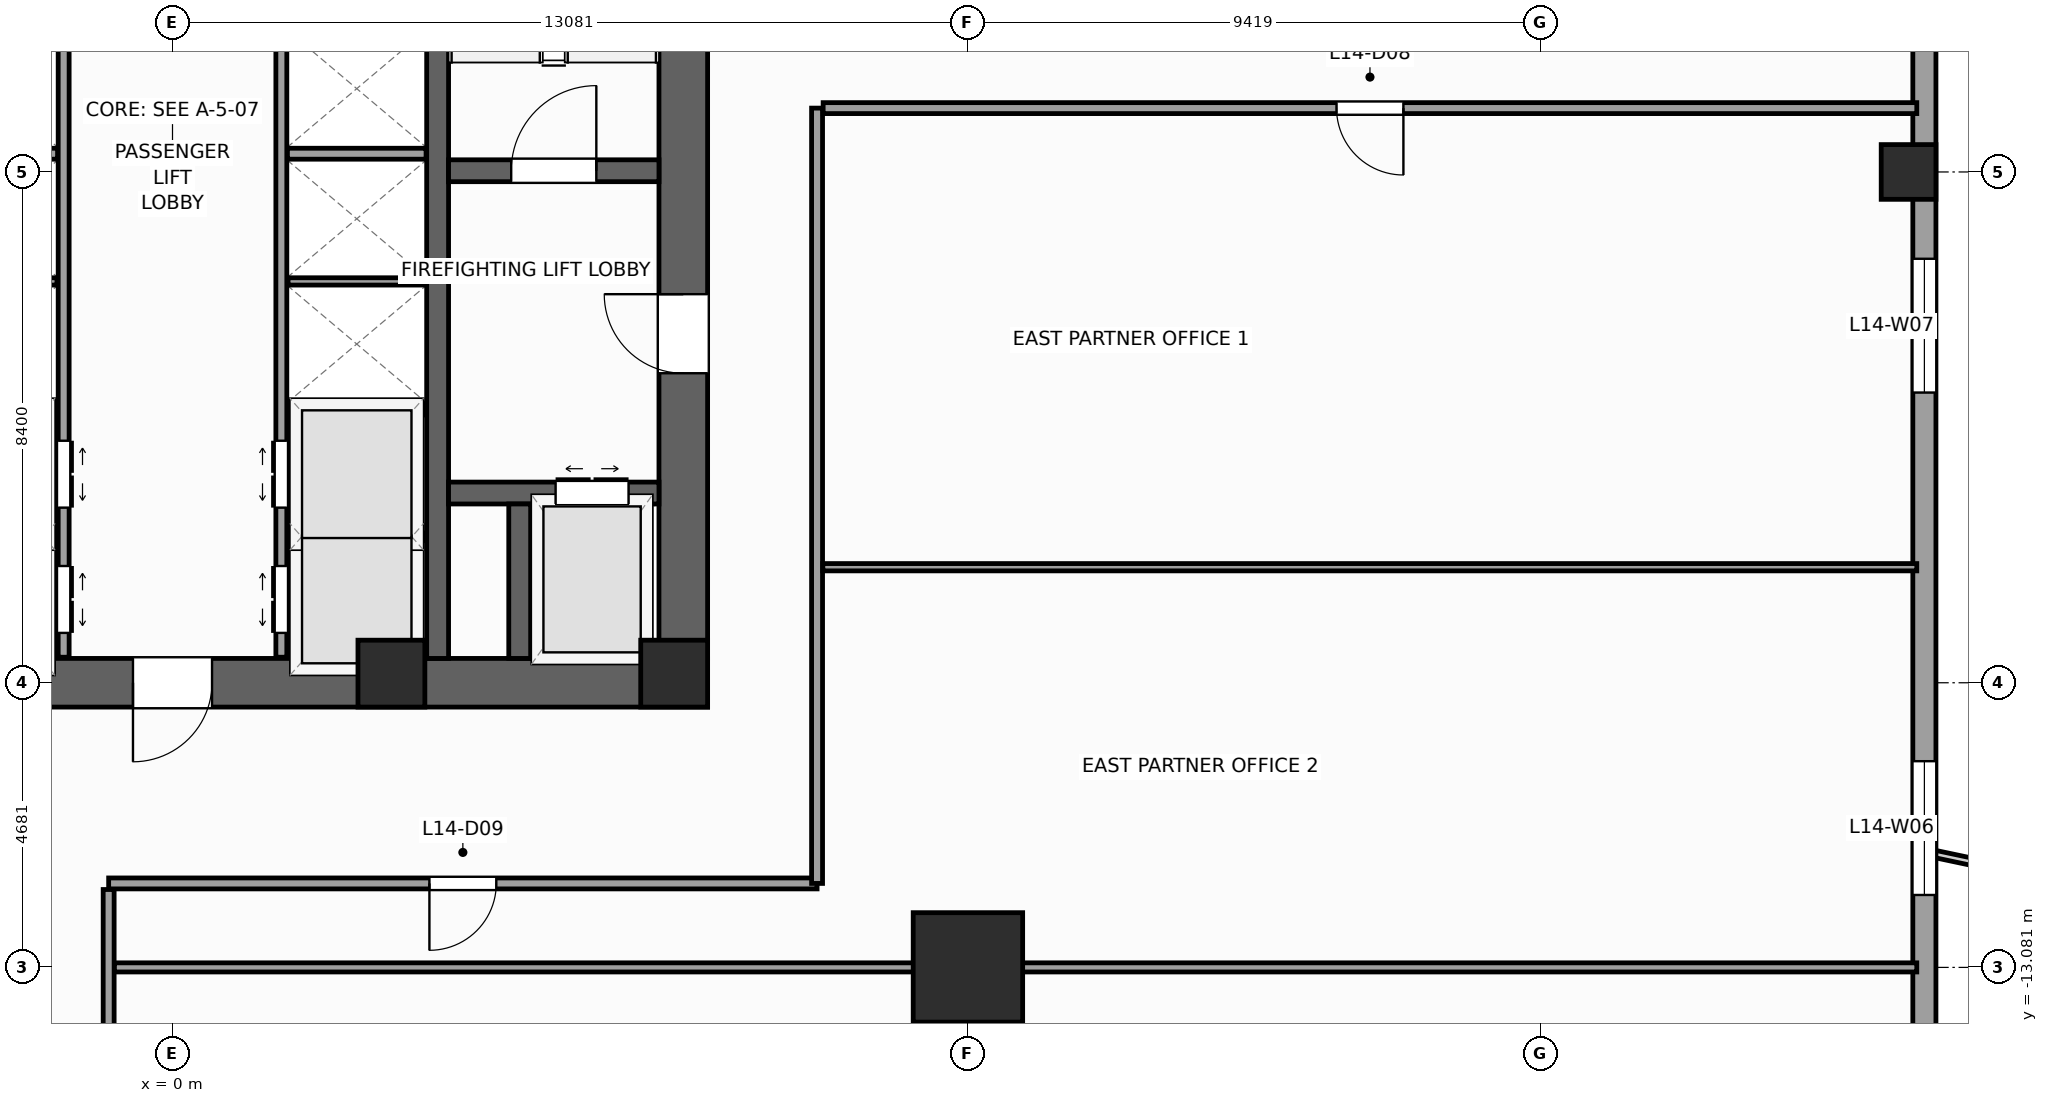
"""IFC4 building model, lengths in metres.
Left out: names, types, materials, properties, quantities, classifications, styles, units other than length and angle.
Written with IfcOpenShell. Run it as: python <this file> out.ifc"""

import sys

from ifc_helpers import new_model, si_unit, direction, frame, frame_2d, origin, origin_2d, place, context, subcontext, project, spatial, rectangle, extrude, source, transform, mapped, element, fill, save


model = new_model("IFC4")
c1 = context("Model", 3, precision=1e-05, world=origin(), true_north=direction((0.0, 1.0)))
c2 = subcontext(c1, "Body", "Model", "MODEL_VIEW")
j1 = project(units=[si_unit("LENGTHUNIT", "METRE"), si_unit("PLANEANGLEUNIT", "RADIAN")], contexts=[c1])
p1 = place(None, origin())
s1 = spatial("IfcSite", under=j1, at=p1, CompositionType="ELEMENT")
p2 = place(p1, origin())
s2 = spatial("IfcBuilding", under=s1, at=p2, CompositionType="ELEMENT")
p3 = place(p2, frame((0.0, 0.0, 62.0)))
s3 = spatial("IfcBuildingStorey", under=s2, at=p3, CompositionType="ELEMENT", Elevation=62.0)
p4 = place(p3, frame((-8.8, -8.4, 0.0), z_axis=(0.0, 0.0, 1.0), x_axis=(1.0, 0.0, 0.0)))
e1 = element("IfcWall", 1, at=p4, inside=s3, PredefinedType="SHEAR", context=c2, shape_type="SweptSolid", body=[
    extrude(rectangle(XDim=17.6, YDim=0.8, at=frame_2d((8.8, 0.0))), origin(), (0.0, 0.0, 1.0), 4.0),
])
p5 = place(p4, frame((8.15, 0.0, 0.0)))
e2 = element("IfcOpeningElement", 2, at=p5, cuts=e1, PredefinedType="OPENING", context=c2, shape_type="SweptSolid", body=[
    extrude(rectangle(XDim=1.3, YDim=2.2, at=frame_2d((0.65, 1.1))), frame((0.0, 0.41, 0.0), z_axis=(0.0, -1.0, 0.0), x_axis=(1.0, 0.0, 0.0)), (0.0, 0.0, 1.0), 0.82),
])
p6 = place(p3, frame((8.4, -8.0, 0.0), z_axis=(0.0, 0.0, 1.0), x_axis=(0.0, 1.0, 0.0)))
e3 = element("IfcWall", 3, at=p6, inside=s3, PredefinedType="SHEAR", context=c2, shape_type="SweptSolid", body=[
    extrude(rectangle(XDim=16.0, YDim=0.8, at=frame_2d((8.0, 0.0))), origin(), (0.0, 0.0, 1.0), 4.0),
])
p7 = place(p6, frame((4.69, 0.0, 0.0)))
e4 = element("IfcOpeningElement", 4, at=p7, cuts=e3, PredefinedType="OPENING", context=c2, shape_type="SweptSolid", body=[
    extrude(rectangle(XDim=1.3, YDim=2.2, at=frame_2d((0.65, 1.1))), frame((0.0, 0.41, 0.0), z_axis=(0.0, -1.0, 0.0), x_axis=(1.0, 0.0, 0.0)), (0.0, 0.0, 1.0), 0.82),
])
p8 = place(p3, frame((4.36, -8.0, 0.0), z_axis=(0.0, 0.0, 1.0), x_axis=(0.0, 1.0, 0.0)))
e5 = element("IfcWall", 5, at=p8, inside=s3, PredefinedType="SHEAR", context=c2, shape_type="SweptSolid", body=[
    extrude(rectangle(XDim=16.0, YDim=0.36, at=frame_2d((8.0, 0.0))), origin(), (0.0, 0.0, 1.0), 4.0),
])
p9 = place(p3, frame((4.54, 0.02, 0.0), z_axis=(0.0, 0.0, 1.0), x_axis=(1.0, 0.0, 0.0)))
e6 = element("IfcWall", 6, at=p9, inside=s3, PredefinedType="SHEAR", context=c2, shape_type="SweptSolid", body=[
    extrude(rectangle(XDim=3.46, YDim=0.36, at=frame_2d((1.73, 0.0))), origin(), (0.0, 0.0, 1.0), 4.0),
])
p10 = place(p9, frame((1.03, 0.0, 0.0)))
e7 = element("IfcOpeningElement", 7, at=p10, cuts=e6, PredefinedType="OPENING", context=c2, shape_type="SweptSolid", body=[
    extrude(rectangle(XDim=1.4, YDim=2.2, at=frame_2d((0.7, 1.1))), frame((0.0, 0.19, 0.0), z_axis=(0.0, -1.0, 0.0), x_axis=(1.0, 0.0, 0.0)), (0.0, 0.0, 1.0), 0.38),
])
p11 = place(p3, frame((4.54, -5.28, 0.0), z_axis=(0.0, 0.0, 1.0), x_axis=(1.0, 0.0, 0.0)))
e8 = element("IfcWall", 8, at=p11, inside=s3, PredefinedType="SHEAR", context=c2, shape_type="SweptSolid", body=[
    extrude(rectangle(XDim=3.46, YDim=0.36, at=frame_2d((1.73, 0.0))), origin(), (0.0, 0.0, 1.0), 4.0),
])
p12 = place(p11, frame((1.76, 0.0, 0.0)))
e9 = element("IfcOpeningElement", 9, at=p12, cuts=e8, PredefinedType="OPENING", context=c2, shape_type="SweptSolid", body=[
    extrude(rectangle(XDim=1.2, YDim=2.25, at=frame_2d((0.6, 1.125))), frame((0.0, 0.19, 0.0), z_axis=(0.0, -1.0, 0.0), x_axis=(1.0, 0.0, 0.0)), (0.0, 0.0, 1.0), 0.38),
])
p13 = place(p3, frame((5.71, -8.0, 0.0), z_axis=(0.0, 0.0, 1.0), x_axis=(0.0, 1.0, 0.0)))
e10 = element("IfcWall", 10, at=p13, inside=s3, PredefinedType="SHEAR", context=c2, shape_type="SweptSolid", body=[
    extrude(rectangle(XDim=2.54, YDim=0.36, at=frame_2d((1.27, 0.0))), origin(), (0.0, 0.0, 1.0), 4.0),
])
m1 = source(origin(), c2, "Body", "SweptSolid", [
    extrude(rectangle(XDim=1.1, YDim=1.1, at=origin_2d()), origin(), (0.0, 0.0, 1.0), 4.0),
])
for number, where, z_axis, x_axis in (
    (11, (8.25, -8.25, 0.0), (0.0, 0.0, 1.0), (1.0, 0.0, 0.0)),
    (12, (3.6, -8.25, 0.0), (0.0, 0.0, 1.0), (1.0, 0.0, 0.0)),
):
    element("IfcColumn", number, at=place(p3, frame(where, z_axis=z_axis, x_axis=x_axis)), inside=s3, PredefinedType="PILASTER", context=c2, shape_type="MappedRepresentation", body=[
        mapped(m1, transform((0.0, 0.0, 0.0), scale=1.0)),
    ])
m2 = source(origin(), c2, "Body", "SweptSolid", [
    extrude(rectangle(XDim=1.8, YDim=1.8, at=origin_2d()), origin(), (0.0, 0.0, 1.0), 4.0),
])
p14 = place(p3, frame((13.081, -13.081, 0.0), z_axis=(0.0, 0.0, 1.0), x_axis=(1.0, 0.0, 0.0)))
e13 = element("IfcColumn", 13, at=p14, inside=s3, PredefinedType="COLUMN", context=c2, shape_type="MappedRepresentation", body=[
    mapped(m2, transform((0.0, 0.0, 0.0), scale=1.0)),
])
m3 = source(origin(), c2, "Body", "SweptSolid", [
    extrude(rectangle(XDim=0.9, YDim=0.9, at=origin_2d()), origin(), (0.0, 0.0, 1.0), 4.0),
])
p15 = place(p3, frame((28.55, 0.0, 0.0), z_axis=(0.0, 0.0, 1.0), x_axis=(1.0, 0.0, 0.0)))
e14 = element("IfcColumn", 14, at=p15, inside=s3, PredefinedType="COLUMN", context=c2, shape_type="MappedRepresentation", body=[
    mapped(m3, transform((0.0, 0.0, 0.0), scale=1.0)),
])
p16 = place(p3, frame((28.81, -25.69, 0.0), z_axis=(0.0, 0.0, 1.0), x_axis=(0.0, 1.0, 0.0)))
e15 = element("IfcWall", 15, at=p16, inside=s3, PredefinedType="STANDARD", context=c2, shape_type="SweptSolid", body=[
    extrude(rectangle(XDim=51.38, YDim=0.38, at=frame_2d((25.69, 0.0))), origin(), (0.0, 0.0, 1.0), 3.12),
])
p17 = place(p16, frame((5.466, 0.0, 0.49)))
e16 = element("IfcOpeningElement", 16, at=p17, cuts=e15, PredefinedType="OPENING", context=c2, shape_type="SweptSolid", body=[
    extrude(rectangle(XDim=1.4, YDim=2.4, at=frame_2d((0.7, 1.2))), frame((0.0, 0.2, 0.0), z_axis=(0.0, -1.0, 0.0), x_axis=(1.0, 0.0, 0.0)), (0.0, 0.0, 1.0), 0.4),
])
p18 = place(p16, frame((13.8, 0.0, 0.49)))
e17 = element("IfcOpeningElement", 17, at=p18, cuts=e15, PredefinedType="OPENING", context=c2, shape_type="SweptSolid", body=[
    extrude(rectangle(XDim=2.2, YDim=2.4, at=frame_2d((1.1, 1.2))), frame((0.0, 0.2, 0.0), z_axis=(0.0, -1.0, 0.0), x_axis=(1.0, 0.0, 0.0)), (0.0, 0.0, 1.0), 0.4),
])
p19 = place(p16, frame((22.062, 0.0, 0.49)))
e18 = element("IfcOpeningElement", 18, at=p19, cuts=e15, PredefinedType="OPENING", context=c2, shape_type="SweptSolid", body=[
    extrude(rectangle(XDim=2.2, YDim=2.4, at=frame_2d((1.1, 1.2))), frame((0.0, 0.2, 0.0), z_axis=(0.0, -1.0, 0.0), x_axis=(1.0, 0.0, 0.0)), (0.0, 0.0, 1.0), 0.4),
])
p20 = place(p16, frame((33.838, 0.0, 0.49)))
e19 = element("IfcOpeningElement", 19, at=p20, cuts=e15, PredefinedType="OPENING", context=c2, shape_type="SweptSolid", body=[
    extrude(rectangle(XDim=2.2, YDim=2.4, at=frame_2d((1.1, 1.2))), frame((0.0, 0.2, 0.0), z_axis=(0.0, -1.0, 0.0), x_axis=(1.0, 0.0, 0.0)), (0.0, 0.0, 1.0), 0.4),
])
p21 = place(p16, frame((43.487, 0.0, 0.49)))
e20 = element("IfcOpeningElement", 20, at=p21, cuts=e15, PredefinedType="OPENING", context=c2, shape_type="SweptSolid", body=[
    extrude(rectangle(XDim=1.4, YDim=2.4, at=frame_2d((0.7, 1.2))), frame((0.0, 0.2, 0.0), z_axis=(0.0, -1.0, 0.0), x_axis=(1.0, 0.0, 0.0)), (0.0, 0.0, 1.0), 0.4),
])
p22 = place(p3, frame((-1.79, -7.98, 0.0), z_axis=(0.0, 0.0, 1.0), x_axis=(0.0, 1.0, 0.0)))
e21 = element("IfcWall", 21, at=p22, inside=s3, PredefinedType="PARTITIONING", context=c2, shape_type="SweptSolid", body=[
    extrude(rectangle(XDim=12.38, YDim=0.18, at=frame_2d((6.19, 0.0))), origin(), (0.0, 0.0, 1.0), 3.72),
])
p23 = place(p22, frame((0.4, 0.0, 0.0)))
e22 = element("IfcOpeningElement", 22, at=p23, cuts=e21, PredefinedType="OPENING", context=c2, shape_type="SweptSolid", body=[
    extrude(rectangle(XDim=1.1, YDim=2.2, at=frame_2d((0.55, 1.1))), frame((0.0, 0.1, 0.0), z_axis=(0.0, -1.0, 0.0), x_axis=(1.0, 0.0, 0.0)), (0.0, 0.0, 1.0), 0.2),
])
p24 = place(p22, frame((2.46, 0.0, 0.0)))
e23 = element("IfcOpeningElement", 23, at=p24, cuts=e21, PredefinedType="OPENING", context=c2, shape_type="SweptSolid", body=[
    extrude(rectangle(XDim=1.1, YDim=2.2, at=frame_2d((0.55, 1.1))), frame((0.0, 0.1, 0.0), z_axis=(0.0, -1.0, 0.0), x_axis=(1.0, 0.0, 0.0)), (0.0, 0.0, 1.0), 0.2),
])
p25 = place(p3, frame((1.79, -7.98, 0.0), z_axis=(0.0, 0.0, 1.0), x_axis=(0.0, 1.0, 0.0)))
e24 = element("IfcWall", 24, at=p25, inside=s3, PredefinedType="PARTITIONING", context=c2, shape_type="SweptSolid", body=[
    extrude(rectangle(XDim=12.38, YDim=0.18, at=frame_2d((6.19, 0.0))), origin(), (0.0, 0.0, 1.0), 3.72),
])
p26 = place(p25, frame((0.4, 0.0, 0.0)))
e25 = element("IfcOpeningElement", 25, at=p26, cuts=e24, PredefinedType="OPENING", context=c2, shape_type="SweptSolid", body=[
    extrude(rectangle(XDim=1.1, YDim=2.2, at=frame_2d((0.55, 1.1))), frame((0.0, 0.1, 0.0), z_axis=(0.0, -1.0, 0.0), x_axis=(1.0, 0.0, 0.0)), (0.0, 0.0, 1.0), 0.2),
])
p27 = place(p25, frame((2.46, 0.0, 0.0)))
e26 = element("IfcOpeningElement", 26, at=p27, cuts=e24, PredefinedType="OPENING", context=c2, shape_type="SweptSolid", body=[
    extrude(rectangle(XDim=1.1, YDim=2.2, at=frame_2d((0.55, 1.1))), frame((0.0, 0.1, 0.0), z_axis=(0.0, -1.0, 0.0), x_axis=(1.0, 0.0, 0.0)), (0.0, 0.0, 1.0), 0.2),
])
for number, where, z_axis, x_axis in (
    (27, (-4.17, -3.9, 0.0), (0.0, 0.0, 1.0), (1.0, 0.0, 0.0)),
    (28, (1.89, -3.9, 0.0), (0.0, 0.0, 1.0), (1.0, 0.0, 0.0)),
    (29, (-4.17, 0.3, 0.0), (0.0, 0.0, 1.0), (1.0, 0.0, 0.0)),
    (30, (1.89, 0.3, 0.0), (0.0, 0.0, 1.0), (1.0, 0.0, 0.0)),
):
    element("IfcWall", number, at=place(p3, frame(where, z_axis=z_axis, x_axis=x_axis)), inside=s3, PredefinedType="PARTITIONING", context=c2, shape_type="SweptSolid", body=[
        extrude(rectangle(XDim=2.28, YDim=0.18, at=frame_2d((1.14, 0.0))), origin(), (0.0, 0.0, 1.0), 3.72),
    ])
for number, where, z_axis, x_axis in (
    (31, (-4.16, -6.0, 0.0), (0.0, 0.0, 1.0), (1.0, 0.0, 0.0)),
    (32, (1.9, -6.0, 0.0), (0.0, 0.0, 1.0), (1.0, 0.0, 0.0)),
    (33, (-4.16, -1.8, 0.0), (0.0, 0.0, 1.0), (1.0, 0.0, 0.0)),
    (34, (1.9, -1.8, 0.0), (0.0, 0.0, 1.0), (1.0, 0.0, 0.0)),
):
    element("IfcWall", number, at=place(p3, frame(where, z_axis=z_axis, x_axis=x_axis)), inside=s3, PredefinedType="PARTITIONING", context=c2, shape_type="SweptSolid", body=[
        extrude(rectangle(XDim=2.26, YDim=0.12, at=frame_2d((1.13, 0.0))), origin(), (0.0, 0.0, 1.0), 3.72),
    ])
p28 = place(p3, frame((-1.05, -11.7, 0.0), z_axis=(0.0, 0.0, 1.0), x_axis=(1.0, 0.0, 0.0)))
e35 = element("IfcWall", 35, at=p28, inside=s3, PredefinedType="PARTITIONING", context=c2, shape_type="SweptSolid", body=[
    extrude(rectangle(XDim=11.65, YDim=0.18, at=frame_2d((5.825, 0.0))), origin(), (0.0, 0.0, 1.0), 3.72),
])
p29 = place(p28, frame((5.275, 0.0, 0.0)))
e36 = element("IfcOpeningElement", 36, at=p29, cuts=e35, PredefinedType="OPENING", context=c2, shape_type="SweptSolid", body=[
    extrude(rectangle(XDim=1.1, YDim=2.2, at=frame_2d((0.55, 1.1))), frame((0.0, 0.1, 0.0), z_axis=(0.0, -1.0, 0.0), x_axis=(1.0, 0.0, 0.0)), (0.0, 0.0, 1.0), 0.2),
])
p30 = place(p3, frame((10.6, -11.7, 0.0), z_axis=(0.0, 0.0, 1.0), x_axis=(0.0, 1.0, 0.0)))
e37 = element("IfcWall", 37, at=p30, inside=s3, PredefinedType="PARTITIONING", context=c2, shape_type="SweptSolid", body=[
    extrude(rectangle(XDim=12.75, YDim=0.18, at=frame_2d((6.375, 0.0))), origin(), (0.0, 0.0, 1.0), 3.72),
])
p31 = place(p3, frame((10.7, 1.05, 0.0), z_axis=(0.0, 0.0, 1.0), x_axis=(1.0, 0.0, 0.0)))
e38 = element("IfcWall", 38, at=p31, inside=s3, PredefinedType="PARTITIONING", context=c2, shape_type="SweptSolid", body=[
    extrude(rectangle(XDim=17.985, YDim=0.18, at=frame_2d((8.993, 0.0))), origin(), (0.0, 0.0, 1.0), 3.72),
])
p32 = place(p31, frame((8.442, 0.0, 0.0)))
e39 = element("IfcOpeningElement", 39, at=p32, cuts=e38, PredefinedType="OPENING", context=c2, shape_type="SweptSolid", body=[
    extrude(rectangle(XDim=1.1, YDim=2.2, at=frame_2d((0.55, 1.1))), frame((0.0, 0.1, 0.0), z_axis=(0.0, -1.0, 0.0), x_axis=(1.0, 0.0, 0.0)), (0.0, 0.0, 1.0), 0.2),
])
p33 = place(p3, frame((-1.05, -28.685, 0.0), z_axis=(0.0, 0.0, 1.0), x_axis=(0.0, 1.0, 0.0)))
e40 = element("IfcWall", 40, at=p33, inside=s3, PredefinedType="PARTITIONING", context=c2, shape_type="SweptSolid", body=[
    extrude(rectangle(XDim=16.885, YDim=0.18, at=frame_2d((8.442, 0.0))), origin(), (0.0, 0.0, 1.0), 3.72),
])
p34 = place(p33, frame((7.417, 0.0, 0.0)))
e41 = element("IfcOpeningElement", 41, at=p34, cuts=e40, PredefinedType="OPENING", context=c2, shape_type="SweptSolid", body=[
    extrude(rectangle(XDim=1.1, YDim=2.2, at=frame_2d((0.55, 1.1))), frame((0.0, 0.1, 0.0), z_axis=(0.0, -1.0, 0.0), x_axis=(1.0, 0.0, 0.0)), (0.0, 0.0, 1.0), 0.2),
])
p35 = place(p3, frame((-0.955, -13.081, 0.0), z_axis=(0.0, 0.0, 1.0), x_axis=(1.0, 0.0, 0.0)))
e42 = element("IfcWall", 42, at=p35, inside=s3, PredefinedType="PARTITIONING", context=c2, shape_type="SweptSolid", body=[
    extrude(rectangle(XDim=29.64, YDim=0.15, at=frame_2d((14.82, 0.0))), origin(), (0.0, 0.0, 1.0), 2.712),
])
p36 = place(p3, frame((10.695, -6.5, 0.0), z_axis=(0.0, 0.0, 1.0), x_axis=(1.0, 0.0, 0.0)))
e43 = element("IfcWall", 43, at=p36, inside=s3, PredefinedType="PARTITIONING", context=c2, shape_type="SweptSolid", body=[
    extrude(rectangle(XDim=17.99, YDim=0.12, at=frame_2d((8.995, 0.0))), origin(), (0.0, 0.0, 1.0), 3.72),
])
m4 = source(origin(), c2, "Body", "SweptSolid", [
    extrude(rectangle(XDim=2.2, YDim=2.4, at=frame_2d((1.1, 1.2))), frame((0.0, 0.03, 0.0), z_axis=(0.0, -1.0, 0.0), x_axis=(1.0, 0.0, 0.0)), (0.0, 0.0, 1.0), 0.06),
])
p37 = place(p18, origin())
e44 = element("IfcWindow", 44, at=p37, inside=s3, PartitioningType="SINGLE_PANEL", PredefinedType="WINDOW", context=c2, shape_type="MappedRepresentation", body=[
    mapped(m4, transform((0.0, 0.0, 0.0), scale=1.0)),
])
fill(e17, e44)
p38 = place(p19, origin())
e45 = element("IfcWindow", 45, at=p38, inside=s3, PartitioningType="SINGLE_PANEL", PredefinedType="WINDOW", context=c2, shape_type="MappedRepresentation", body=[
    mapped(m4, transform((0.0, 0.0, 0.0), scale=1.0)),
])
fill(e18, e45)
m5 = source(origin(), c2, "Body", "SweptSolid", [
    extrude(rectangle(XDim=1.4, YDim=2.2, at=frame_2d((0.7, 1.1))), frame((0.0, 0.025, 0.0), z_axis=(0.0, -1.0, 0.0), x_axis=(1.0, 0.0, 0.0)), (0.0, 0.0, 1.0), 0.05),
])
p39 = place(p10, origin())
e46 = element("IfcDoor", 46, at=p39, inside=s3, OperationType="SINGLE_SWING_RIGHT", PredefinedType="DOOR", context=c2, shape_type="MappedRepresentation", body=[
    mapped(m5, transform((0.0, 0.0, 0.0), scale=1.0)),
])
fill(e7, e46)
m6 = source(origin(), c2, "Body", "SweptSolid", [
    extrude(rectangle(XDim=1.3, YDim=2.2, at=frame_2d((0.65, 1.1))), frame((0.0, 0.025, 0.0), z_axis=(0.0, -1.0, 0.0), x_axis=(1.0, 0.0, 0.0)), (0.0, 0.0, 1.0), 0.05),
])
p40 = place(p7, origin())
e47 = element("IfcDoor", 47, at=p40, inside=s3, OperationType="SINGLE_SWING_RIGHT", PredefinedType="DOOR", context=c2, shape_type="MappedRepresentation", body=[
    mapped(m6, transform((0.0, 0.0, 0.0), scale=1.0)),
])
fill(e4, e47)
p41 = place(p5, frame((1.3, 0.0, 0.0), z_axis=(0.0, 0.0, 1.0), x_axis=(-1.0, 0.0, 0.0)))
e48 = element("IfcDoor", 48, at=p41, inside=s3, OperationType="SINGLE_SWING_LEFT", PredefinedType="DOOR", context=c2, shape_type="MappedRepresentation", body=[
    mapped(m6, transform((0.0, 0.0, 0.0), scale=1.0)),
])
fill(e2, e48)
m7 = source(origin(), c2, "Body", "SweptSolid", [
    extrude(rectangle(XDim=1.2, YDim=2.25, at=frame_2d((0.6, 1.125))), frame((0.0, 0.025, 0.0), z_axis=(0.0, -1.0, 0.0), x_axis=(1.0, 0.0, 0.0)), (0.0, 0.0, 1.0), 0.05),
])
p42 = place(p12, origin())
e49 = element("IfcDoor", 49, at=p42, inside=s3, OperationType="DOUBLE_DOOR_SLIDING", PredefinedType="DOOR", context=c2, shape_type="MappedRepresentation", body=[
    mapped(m7, transform((0.0, 0.0, 0.0), scale=1.0)),
])
fill(e9, e49)
m8 = source(origin(), c2, "Body", "SweptSolid", [
    extrude(rectangle(XDim=1.1, YDim=2.2, at=frame_2d((0.55, 1.1))), frame((0.0, 0.025, 0.0), z_axis=(0.0, -1.0, 0.0), x_axis=(1.0, 0.0, 0.0)), (0.0, 0.0, 1.0), 0.05),
])
p43 = place(p23, frame((1.1, 0.0, 0.0), z_axis=(0.0, 0.0, 1.0), x_axis=(-1.0, 0.0, 0.0)))
e50 = element("IfcDoor", 50, at=p43, inside=s3, OperationType="DOUBLE_DOOR_SLIDING", PredefinedType="DOOR", context=c2, shape_type="MappedRepresentation", body=[
    mapped(m8, transform((0.0, 0.0, 0.0), scale=1.0)),
])
fill(e22, e50)
p44 = place(p24, frame((1.1, 0.0, 0.0), z_axis=(0.0, 0.0, 1.0), x_axis=(-1.0, 0.0, 0.0)))
e51 = element("IfcDoor", 51, at=p44, inside=s3, OperationType="DOUBLE_DOOR_SLIDING", PredefinedType="DOOR", context=c2, shape_type="MappedRepresentation", body=[
    mapped(m8, transform((0.0, 0.0, 0.0), scale=1.0)),
])
fill(e23, e51)
p45 = place(p26, origin())
e52 = element("IfcDoor", 52, at=p45, inside=s3, OperationType="DOUBLE_DOOR_SLIDING", PredefinedType="DOOR", context=c2, shape_type="MappedRepresentation", body=[
    mapped(m8, transform((0.0, 0.0, 0.0), scale=1.0)),
])
fill(e25, e52)
p46 = place(p27, origin())
e53 = element("IfcDoor", 53, at=p46, inside=s3, OperationType="DOUBLE_DOOR_SLIDING", PredefinedType="DOOR", context=c2, shape_type="MappedRepresentation", body=[
    mapped(m8, transform((0.0, 0.0, 0.0), scale=1.0)),
])
fill(e26, e53)
p47 = place(p32, frame((1.1, 0.0, 0.0), z_axis=(0.0, 0.0, 1.0), x_axis=(-1.0, 0.0, 0.0)))
e54 = element("IfcDoor", 54, at=p47, inside=s3, OperationType="SINGLE_SWING_RIGHT", PredefinedType="DOOR", context=c2, shape_type="MappedRepresentation", body=[
    mapped(m8, transform((0.0, 0.0, 0.0), scale=1.0)),
])
fill(e39, e54)
p48 = place(p29, frame((1.1, 0.0, 0.0), z_axis=(0.0, 0.0, 1.0), x_axis=(-1.0, 0.0, 0.0)))
e55 = element("IfcDoor", 55, at=p48, inside=s3, OperationType="SINGLE_SWING_LEFT", PredefinedType="DOOR", context=c2, shape_type="MappedRepresentation", body=[
    mapped(m8, transform((0.0, 0.0, 0.0), scale=1.0)),
])
fill(e36, e55)
save(model, sys.argv[1])
